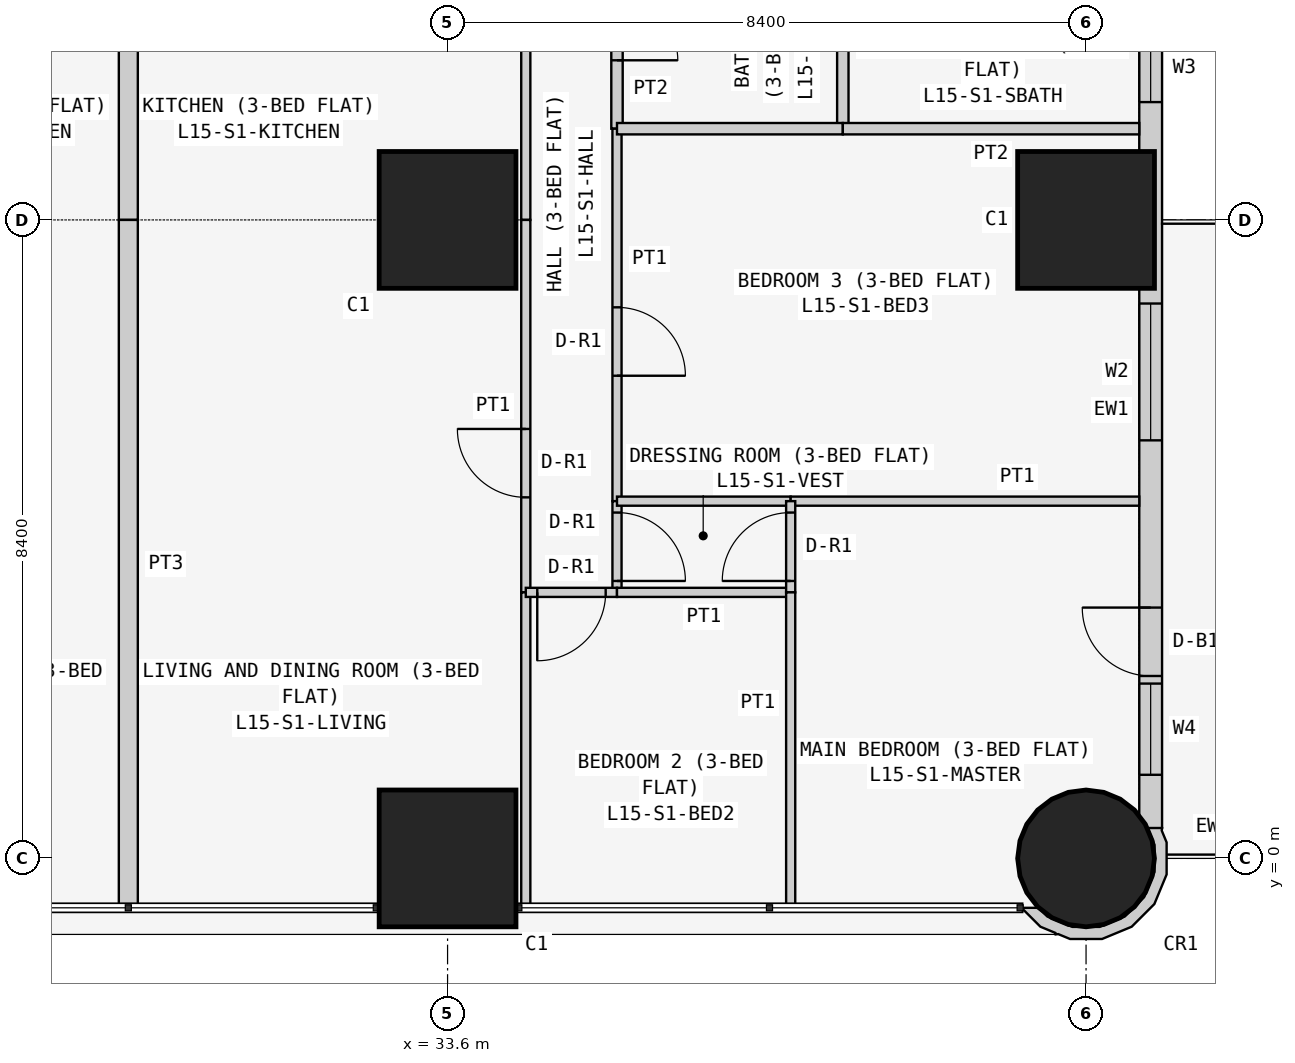
"""IFC4 building model, lengths in metres.
Left out: names, types, materials, properties, quantities, classifications, styles, units other than length and angle.
Written with IfcOpenShell. Run it as: python <this file> out.ifc"""

import sys

from ifc_helpers import new_model, si_unit, direction, frame, frame_2d, origin, origin_2d, place, context, subcontext, project, spatial, polyline, rectangle, circle, outline, extrude, element, fill, save


model = new_model("IFC4")
c1 = context("Model", 3, precision=1e-05, world=origin(), true_north=direction((0.0, 1.0)))
c2 = subcontext(c1, "Body", "Model", "MODEL_VIEW")
j1 = project(units=[si_unit("LENGTHUNIT", "METRE"), si_unit("PLANEANGLEUNIT", "RADIAN")], contexts=[c1])
p1 = place(None, origin())
s1 = spatial("IfcSite", under=j1, at=p1, CompositionType="ELEMENT")
p2 = place(p1, origin())
s2 = spatial("IfcBuilding", under=s1, at=p2, CompositionType="ELEMENT")
p3 = place(p2, frame((0.0, 0.0, 63.3)))
s3 = spatial("IfcBuildingStorey", under=s2, at=p3, CompositionType="ELEMENT", Elevation=63.3)
for number, where, z_axis, x_axis in (
    (1, (33.6, 0.0, 0.0), (0.0, 0.0, 1.0), (1.0, 0.0, 0.0)),
    (2, (33.6, 8.4, 0.0), (0.0, 0.0, 1.0), (1.0, 0.0, 0.0)),
):
    element("IfcColumn", number, at=place(p3, frame(where, z_axis=z_axis, x_axis=x_axis)), inside=s3, PredefinedType="COLUMN", context=c2, shape_type="SweptSolid", body=[
        extrude(rectangle(XDim=1.8, YDim=1.8, at=origin_2d()), origin(), (0.0, 0.0, 1.0), 3.6),
    ])
p4 = place(p3, frame((42.0, 0.0, 0.0), z_axis=(0.0, 0.0, 1.0), x_axis=(1.0, 0.0, 0.0)))
e3 = element("IfcColumn", 3, at=p4, inside=s3, PredefinedType="COLUMN", context=c2, shape_type="SweptSolid", body=[
    extrude(circle(Radius=0.9, at=origin_2d()), origin(), (0.0, 0.0, 1.0), 3.6),
])
p5 = place(p3, frame((42.0, 8.4, 0.0), z_axis=(0.0, 0.0, 1.0), x_axis=(1.0, 0.0, 0.0)))
e4 = element("IfcColumn", 4, at=p5, inside=s3, PredefinedType="COLUMN", context=c2, shape_type="SweptSolid", body=[
    extrude(rectangle(XDim=1.8, YDim=1.8, at=origin_2d()), origin(), (0.0, 0.0, 1.0), 3.6),
])
p6 = place(p3, frame((42.85, 0.4, 0.0), z_axis=(0.0, 0.0, 1.0), x_axis=(0.0, 1.0, 0.0)))
e5 = element("IfcWall", 5, at=p6, inside=s3, PredefinedType="SOLIDWALL", context=c2, shape_type="SweptSolid", body=[
    extrude(rectangle(XDim=15.7, YDim=0.3, at=frame_2d((7.85, 0.0))), origin(), (0.0, 0.0, 1.0), 3.45),
])
p7 = place(p6, frame((12.4, 0.0, 0.9)))
e6 = element("IfcOpeningElement", 6, at=p7, cuts=e5, PredefinedType="OPENING", context=c2, shape_type="SweptSolid", body=[
    extrude(rectangle(XDim=1.8, YDim=1.5, at=frame_2d((0.9, 0.75))), frame((0.0, 0.16, 0.0), z_axis=(0.0, -1.0, 0.0), x_axis=(1.0, 0.0, 0.0)), (0.0, 0.0, 1.0), 0.32),
])
p8 = place(p6, frame((9.55, 0.0, 1.5)))
e7 = element("IfcOpeningElement", 7, at=p8, cuts=e5, PredefinedType="OPENING", context=c2, shape_type="SweptSolid", body=[
    extrude(rectangle(XDim=0.9, YDim=0.7, at=frame_2d((0.45, 0.35))), frame((0.0, 0.16, 0.0), z_axis=(0.0, -1.0, 0.0), x_axis=(1.0, 0.0, 0.0)), (0.0, 0.0, 1.0), 0.32),
])
p9 = place(p6, frame((5.1, 0.0, 0.9)))
e8 = element("IfcOpeningElement", 8, at=p9, cuts=e5, PredefinedType="OPENING", context=c2, shape_type="SweptSolid", body=[
    extrude(rectangle(XDim=1.8, YDim=1.5, at=frame_2d((0.9, 0.75))), frame((0.0, 0.16, 0.0), z_axis=(0.0, -1.0, 0.0), x_axis=(1.0, 0.0, 0.0)), (0.0, 0.0, 1.0), 0.32),
])
p10 = place(p6, frame((2.0, 0.0, 0.0)))
e9 = element("IfcOpeningElement", 9, at=p10, cuts=e5, PredefinedType="OPENING", context=c2, shape_type="SweptSolid", body=[
    extrude(rectangle(XDim=0.9, YDim=2.4, at=frame_2d((0.45, 1.2))), frame((0.0, 0.16, 0.0), z_axis=(0.0, -1.0, 0.0), x_axis=(1.0, 0.0, 0.0)), (0.0, 0.0, 1.0), 0.32),
])
p11 = place(p6, frame((0.7, 0.0, 0.9)))
e10 = element("IfcOpeningElement", 10, at=p11, cuts=e5, PredefinedType="OPENING", context=c2, shape_type="SweptSolid", body=[
    extrude(rectangle(XDim=1.2, YDim=1.5, at=frame_2d((0.6, 0.75))), frame((0.0, 0.16, 0.0), z_axis=(0.0, -1.0, 0.0), x_axis=(1.0, 0.0, 0.0)), (0.0, 0.0, 1.0), 0.32),
])
p12 = place(p3, frame((41.233, -0.611, 0.0), z_axis=(0.0, 0.0, 1.0), x_axis=(0.377204953059, -0.926129809145, 0.0)))
e11 = element("IfcWall", 11, at=p12, inside=s3, PredefinedType="SOLIDWALL", context=c2, shape_type="SweptSolid", body=[
    extrude(outline(polyline([(0.319, 1.843), (-0.072, 2.001), (-0.24, 2.001), (-0.269, 2.017), (-0.37, 1.841), (-0.102, 1.842), (0.23, 1.707), (0.485, 1.455), (0.624, 1.125), (0.626, 0.766), (0.49, 0.434), (0.239, 0.179), (0.09, 0.117), (0.011, -0.078), (0.024, -0.083), (0.33, 0.045), (0.48, 0.197), (0.499, 0.193), (0.508, 0.225), (0.626, 0.345), (0.785, 0.736), (0.782, 1.157), (0.619, 1.546), (0.319, 1.843)])), origin(), (0.0, 0.0, 1.0), 3.45),
])
p13 = place(p3, frame((34.629, 8.4, 0.0), z_axis=(0.0, 0.0, 1.0), x_axis=(0.0, 1.0, 0.0)))
e12 = element("IfcWall", 12, at=p13, inside=s3, PredefinedType="PARTITIONING", context=c2, shape_type="SweptSolid", body=[
    extrude(rectangle(XDim=2.4, YDim=0.12, at=frame_2d((1.2, 0.0))), origin(), (0.0, 0.0, 1.0), 3.45),
])
p14 = place(p3, frame((29.4, 10.8, 0.0), z_axis=(0.0, 0.0, 1.0), x_axis=(0.0, -1.0, 0.0)))
e13 = element("IfcWall", 13, at=p14, inside=s3, PredefinedType="PARTITIONING", context=c2, shape_type="SweptSolid", body=[
    extrude(rectangle(XDim=2.4, YDim=0.25, at=frame_2d((1.2, 0.0))), origin(), (0.0, 0.0, 1.0), 2.848),
])
p15 = place(p3, frame((34.629, 3.5, 0.0), z_axis=(0.0, 0.0, 1.0), x_axis=(0.0, 1.0, 0.0)))
e14 = element("IfcWall", 14, at=p15, inside=s3, PredefinedType="PARTITIONING", context=c2, shape_type="SweptSolid", body=[
    extrude(rectangle(XDim=4.9, YDim=0.12, at=frame_2d((2.45, 0.0))), origin(), (0.0, 0.0, 1.0), 3.45),
])
p16 = place(p15, frame((1.25, 0.0, 0.0)))
e15 = element("IfcOpeningElement", 15, at=p16, cuts=e14, PredefinedType="OPENING", context=c2, shape_type="SweptSolid", body=[
    extrude(rectangle(XDim=0.9, YDim=2.1, at=frame_2d((0.45, 1.05))), frame((0.0, 0.07, 0.0), z_axis=(0.0, -1.0, 0.0), x_axis=(1.0, 0.0, 0.0)), (0.0, 0.0, 1.0), 0.14),
])
p17 = place(p3, frame((34.629, -0.65, 0.0), z_axis=(0.0, 0.0, 1.0), x_axis=(0.0, 1.0, 0.0)))
e16 = element("IfcWall", 16, at=p17, inside=s3, PredefinedType="PARTITIONING", context=c2, shape_type="SweptSolid", body=[
    extrude(rectangle(XDim=4.15, YDim=0.12, at=frame_2d((2.075, 0.0))), origin(), (0.0, 0.0, 1.0), 3.45),
])
p18 = place(p3, frame((29.4, 8.4, 0.0), z_axis=(0.0, 0.0, 1.0), x_axis=(0.0, -1.0, 0.0)))
e17 = element("IfcWall", 17, at=p18, inside=s3, PredefinedType="PARTITIONING", context=c2, shape_type="SweptSolid", body=[
    extrude(rectangle(XDim=9.05, YDim=0.25, at=frame_2d((4.525, 0.0))), origin(), (0.0, 0.0, 1.0), 2.848),
])
p19 = place(p3, frame((35.829, 9.6, 0.0), z_axis=(0.0, 0.0, 1.0), x_axis=(0.0, 1.0, 0.0)))
e18 = element("IfcWall", 18, at=p19, inside=s3, PredefinedType="PARTITIONING", context=c2, shape_type="SweptSolid", body=[
    extrude(rectangle(XDim=2.6, YDim=0.15, at=frame_2d((1.3, 0.0))), origin(), (0.0, 0.0, 1.0), 3.45),
])
p20 = place(p19, frame((0.9, 0.0, 0.0)))
e19 = element("IfcOpeningElement", 19, at=p20, cuts=e18, PredefinedType="OPENING", context=c2, shape_type="SweptSolid", body=[
    extrude(rectangle(XDim=0.8, YDim=2.1, at=frame_2d((0.4, 1.05))), frame((0.0, 0.085, 0.0), z_axis=(0.0, -1.0, 0.0), x_axis=(1.0, 0.0, 0.0)), (0.0, 0.0, 1.0), 0.17),
])
p21 = place(p3, frame((35.829, 4.7, 0.0), z_axis=(0.0, 0.0, 1.0), x_axis=(0.0, 1.0, 0.0)))
e20 = element("IfcWall", 20, at=p21, inside=s3, PredefinedType="PARTITIONING", context=c2, shape_type="SweptSolid", body=[
    extrude(rectangle(XDim=4.9, YDim=0.12, at=frame_2d((2.45, 0.0))), origin(), (0.0, 0.0, 1.0), 3.45),
])
p22 = place(p21, frame((1.65, 0.0, 0.0)))
e21 = element("IfcOpeningElement", 21, at=p22, cuts=e20, PredefinedType="OPENING", context=c2, shape_type="SweptSolid", body=[
    extrude(rectangle(XDim=0.9, YDim=2.1, at=frame_2d((0.45, 1.05))), frame((0.0, 0.07, 0.0), z_axis=(0.0, -1.0, 0.0), x_axis=(1.0, 0.0, 0.0)), (0.0, 0.0, 1.0), 0.14),
])
p23 = place(p3, frame((35.829, 3.5, 0.0), z_axis=(0.0, 0.0, 1.0), x_axis=(0.0, 1.0, 0.0)))
e22 = element("IfcWall", 22, at=p23, inside=s3, PredefinedType="PARTITIONING", context=c2, shape_type="SweptSolid", body=[
    extrude(rectangle(XDim=1.2, YDim=0.12, at=frame_2d((0.6, 0.0))), origin(), (0.0, 0.0, 1.0), 3.45),
])
p24 = place(p23, frame((0.15, 0.0, 0.0)))
e23 = element("IfcOpeningElement", 23, at=p24, cuts=e22, PredefinedType="OPENING", context=c2, shape_type="SweptSolid", body=[
    extrude(rectangle(XDim=0.9, YDim=2.1, at=frame_2d((0.45, 1.05))), frame((0.0, 0.07, 0.0), z_axis=(0.0, -1.0, 0.0), x_axis=(1.0, 0.0, 0.0)), (0.0, 0.0, 1.0), 0.14),
])
p25 = place(p3, frame((34.629, 3.5, 0.0), z_axis=(0.0, 0.0, 1.0), x_axis=(1.0, 0.0, 0.0)))
e24 = element("IfcWall", 24, at=p25, inside=s3, PredefinedType="PARTITIONING", context=c2, shape_type="SweptSolid", body=[
    extrude(rectangle(XDim=1.2, YDim=0.12, at=frame_2d((0.6, 0.0))), origin(), (0.0, 0.0, 1.0), 3.45),
])
p26 = place(p25, frame((0.151, 0.0, 0.0)))
e25 = element("IfcOpeningElement", 25, at=p26, cuts=e24, PredefinedType="OPENING", context=c2, shape_type="SweptSolid", body=[
    extrude(rectangle(XDim=0.9, YDim=2.1, at=frame_2d((0.45, 1.05))), frame((0.0, 0.07, 0.0), z_axis=(0.0, -1.0, 0.0), x_axis=(1.0, 0.0, 0.0)), (0.0, 0.0, 1.0), 0.14),
])
p27 = place(p3, frame((38.8, 9.6, 0.0), z_axis=(0.0, 0.0, 1.0), x_axis=(0.0, 1.0, 0.0)))
e26 = element("IfcWall", 26, at=p27, inside=s3, PredefinedType="PARTITIONING", context=c2, shape_type="SweptSolid", body=[
    extrude(rectangle(XDim=2.6, YDim=0.15, at=frame_2d((1.3, 0.0))), origin(), (0.0, 0.0, 1.0), 3.45),
])
p28 = place(p3, frame((35.829, 9.6, 0.0), z_axis=(0.0, 0.0, 1.0), x_axis=(1.0, 0.0, 0.0)))
e27 = element("IfcWall", 27, at=p28, inside=s3, PredefinedType="PARTITIONING", context=c2, shape_type="SweptSolid", body=[
    extrude(rectangle(XDim=2.971, YDim=0.15, at=frame_2d((1.485, 0.0))), origin(), (0.0, 0.0, 1.0), 3.45),
])
p29 = place(p3, frame((38.8, 9.6, 0.0), z_axis=(0.0, 0.0, 1.0), x_axis=(1.0, 0.0, 0.0)))
e28 = element("IfcWall", 28, at=p29, inside=s3, PredefinedType="PARTITIONING", context=c2, shape_type="SweptSolid", body=[
    extrude(rectangle(XDim=3.9, YDim=0.15, at=frame_2d((1.95, 0.0))), origin(), (0.0, 0.0, 1.0), 3.45),
])
p30 = place(p3, frame((35.829, 4.7, 0.0), z_axis=(0.0, 0.0, 1.0), x_axis=(1.0, 0.0, 0.0)))
e29 = element("IfcWall", 29, at=p30, inside=s3, PredefinedType="PARTITIONING", context=c2, shape_type="SweptSolid", body=[
    extrude(rectangle(XDim=2.285, YDim=0.12, at=frame_2d((1.143, 0.0))), origin(), (0.0, 0.0, 1.0), 3.45),
])
p31 = place(p3, frame((38.114, 4.7, 0.0), z_axis=(0.0, 0.0, 1.0), x_axis=(1.0, 0.0, 0.0)))
e30 = element("IfcWall", 30, at=p31, inside=s3, PredefinedType="PARTITIONING", context=c2, shape_type="SweptSolid", body=[
    extrude(rectangle(XDim=4.586, YDim=0.12, at=frame_2d((2.293, 0.0))), origin(), (0.0, 0.0, 1.0), 3.45),
])
p32 = place(p3, frame((35.829, 3.5, 0.0), z_axis=(0.0, 0.0, 1.0), x_axis=(1.0, 0.0, 0.0)))
e31 = element("IfcWall", 31, at=p32, inside=s3, PredefinedType="PARTITIONING", context=c2, shape_type="SweptSolid", body=[
    extrude(rectangle(XDim=2.285, YDim=0.12, at=frame_2d((1.143, 0.0))), origin(), (0.0, 0.0, 1.0), 3.45),
])
p33 = place(p3, frame((38.114, 3.5, 0.0), z_axis=(0.0, 0.0, 1.0), x_axis=(0.0, 1.0, 0.0)))
e32 = element("IfcWall", 32, at=p33, inside=s3, PredefinedType="PARTITIONING", context=c2, shape_type="SweptSolid", body=[
    extrude(rectangle(XDim=1.2, YDim=0.12, at=frame_2d((0.6, 0.0))), origin(), (0.0, 0.0, 1.0), 3.45),
])
p34 = place(p33, frame((0.15, 0.0, 0.0)))
e33 = element("IfcOpeningElement", 33, at=p34, cuts=e32, PredefinedType="OPENING", context=c2, shape_type="SweptSolid", body=[
    extrude(rectangle(XDim=0.9, YDim=2.1, at=frame_2d((0.45, 1.05))), frame((0.0, 0.07, 0.0), z_axis=(0.0, -1.0, 0.0), x_axis=(1.0, 0.0, 0.0)), (0.0, 0.0, 1.0), 0.14),
])
p35 = place(p3, frame((38.114, -0.65, 0.0), z_axis=(0.0, 0.0, 1.0), x_axis=(0.0, 1.0, 0.0)))
e34 = element("IfcWall", 34, at=p35, inside=s3, PredefinedType="PARTITIONING", context=c2, shape_type="SweptSolid", body=[
    extrude(rectangle(XDim=4.15, YDim=0.12, at=frame_2d((2.075, 0.0))), origin(), (0.0, 0.0, 1.0), 3.45),
])
p36 = place(p8, origin())
e35 = element("IfcWindow", 35, at=p36, inside=s3, PartitioningType="SINGLE_PANEL", PredefinedType="WINDOW", context=c2, shape_type="SweptSolid", body=[
    extrude(rectangle(XDim=0.9, YDim=0.7, at=frame_2d((0.45, 0.35))), frame((0.0, 0.03, 0.0), z_axis=(0.0, -1.0, 0.0), x_axis=(1.0, 0.0, 0.0)), (0.0, 0.0, 1.0), 0.06),
])
fill(e7, e35)
p37 = place(p9, origin())
e36 = element("IfcWindow", 36, at=p37, inside=s3, PartitioningType="SINGLE_PANEL", PredefinedType="WINDOW", context=c2, shape_type="SweptSolid", body=[
    extrude(rectangle(XDim=1.8, YDim=1.5, at=frame_2d((0.9, 0.75))), frame((0.0, 0.03, 0.0), z_axis=(0.0, -1.0, 0.0), x_axis=(1.0, 0.0, 0.0)), (0.0, 0.0, 1.0), 0.06),
])
fill(e8, e36)
p38 = place(p10, origin())
e37 = element("IfcDoor", 37, at=p38, inside=s3, OperationType="SINGLE_SWING_RIGHT", PredefinedType="DOOR", context=c2, shape_type="SweptSolid", body=[
    extrude(rectangle(XDim=0.9, YDim=2.4, at=frame_2d((0.45, 1.2))), frame((0.0, 0.025, 0.0), z_axis=(0.0, -1.0, 0.0), x_axis=(1.0, 0.0, 0.0)), (0.0, 0.0, 1.0), 0.05),
])
fill(e9, e37)
p39 = place(p11, origin())
e38 = element("IfcWindow", 38, at=p39, inside=s3, PartitioningType="SINGLE_PANEL", PredefinedType="WINDOW", context=c2, shape_type="SweptSolid", body=[
    extrude(rectangle(XDim=1.2, YDim=1.5, at=frame_2d((0.6, 0.75))), frame((0.0, 0.03, 0.0), z_axis=(0.0, -1.0, 0.0), x_axis=(1.0, 0.0, 0.0)), (0.0, 0.0, 1.0), 0.06),
])
fill(e10, e38)
p40 = place(p16, origin())
e39 = element("IfcDoor", 39, at=p40, inside=s3, OperationType="SINGLE_SWING_RIGHT", PredefinedType="DOOR", context=c2, shape_type="SweptSolid", body=[
    extrude(rectangle(XDim=0.9, YDim=2.1, at=frame_2d((0.45, 1.05))), frame((0.0, 0.025, 0.0), z_axis=(0.0, -1.0, 0.0), x_axis=(1.0, 0.0, 0.0)), (0.0, 0.0, 1.0), 0.05),
])
fill(e15, e39)
p41 = place(p20, frame((0.8, 0.0, 0.0), z_axis=(0.0, 0.0, 1.0), x_axis=(-1.0, 0.0, 0.0)))
e40 = element("IfcDoor", 40, at=p41, inside=s3, OperationType="SINGLE_SWING_RIGHT", PredefinedType="DOOR", context=c2, shape_type="SweptSolid", body=[
    extrude(rectangle(XDim=0.8, YDim=2.1, at=frame_2d((0.4, 1.05))), frame((0.0, 0.025, 0.0), z_axis=(0.0, -1.0, 0.0), x_axis=(1.0, 0.0, 0.0)), (0.0, 0.0, 1.0), 0.05),
])
fill(e19, e40)
p42 = place(p22, frame((0.9, 0.0, 0.0), z_axis=(0.0, 0.0, 1.0), x_axis=(-1.0, 0.0, 0.0)))
e41 = element("IfcDoor", 41, at=p42, inside=s3, OperationType="SINGLE_SWING_RIGHT", PredefinedType="DOOR", context=c2, shape_type="SweptSolid", body=[
    extrude(rectangle(XDim=0.9, YDim=2.1, at=frame_2d((0.45, 1.05))), frame((0.0, 0.025, 0.0), z_axis=(0.0, -1.0, 0.0), x_axis=(1.0, 0.0, 0.0)), (0.0, 0.0, 1.0), 0.05),
])
fill(e21, e41)
p43 = place(p24, frame((0.9, 0.0, 0.0), z_axis=(0.0, 0.0, 1.0), x_axis=(-1.0, 0.0, 0.0)))
e42 = element("IfcDoor", 42, at=p43, inside=s3, OperationType="SINGLE_SWING_RIGHT", PredefinedType="DOOR", context=c2, shape_type="SweptSolid", body=[
    extrude(rectangle(XDim=0.9, YDim=2.1, at=frame_2d((0.45, 1.05))), frame((0.0, 0.025, 0.0), z_axis=(0.0, -1.0, 0.0), x_axis=(1.0, 0.0, 0.0)), (0.0, 0.0, 1.0), 0.05),
])
fill(e23, e42)
p44 = place(p34, origin())
e43 = element("IfcDoor", 43, at=p44, inside=s3, OperationType="SINGLE_SWING_LEFT", PredefinedType="DOOR", context=c2, shape_type="SweptSolid", body=[
    extrude(rectangle(XDim=0.9, YDim=2.1, at=frame_2d((0.45, 1.05))), frame((0.0, 0.025, 0.0), z_axis=(0.0, -1.0, 0.0), x_axis=(1.0, 0.0, 0.0)), (0.0, 0.0, 1.0), 0.05),
])
fill(e33, e43)
p45 = place(p26, frame((0.9, 0.0, 0.0), z_axis=(0.0, 0.0, 1.0), x_axis=(-1.0, 0.0, 0.0)))
e44 = element("IfcDoor", 44, at=p45, inside=s3, OperationType="SINGLE_SWING_RIGHT", PredefinedType="DOOR", context=c2, shape_type="SweptSolid", body=[
    extrude(rectangle(XDim=0.9, YDim=2.1, at=frame_2d((0.45, 1.05))), frame((0.0, 0.025, 0.0), z_axis=(0.0, -1.0, 0.0), x_axis=(1.0, 0.0, 0.0)), (0.0, 0.0, 1.0), 0.05),
])
fill(e25, e44)
save(model, sys.argv[1])
